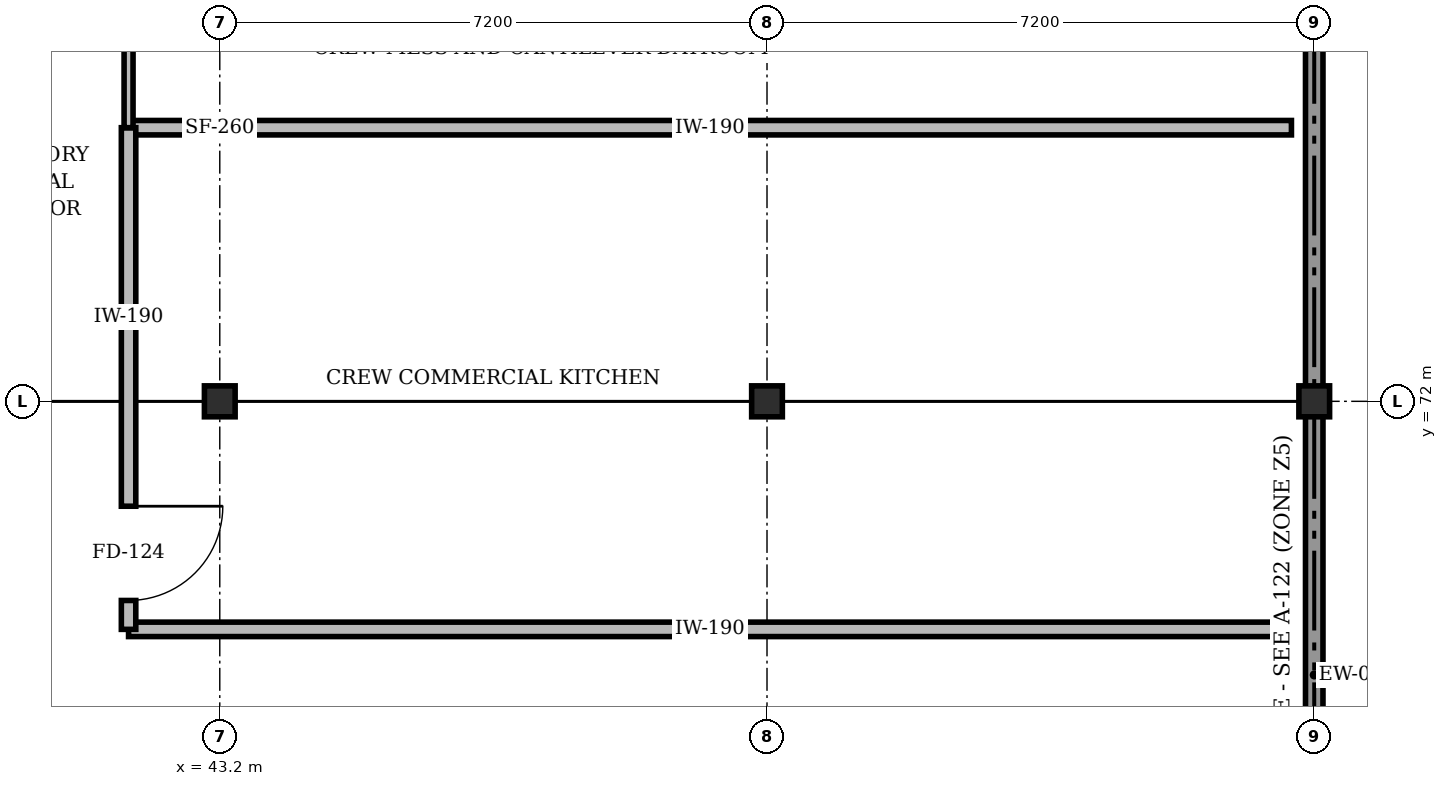
"""IFC4 building model, lengths in metres.
Left out: names, types, materials, properties, quantities, classifications, styles, units other than length and angle.
Written with IfcOpenShell. Run it as: python <this file> out.ifc"""

import sys

from ifc_helpers import new_model, si_unit, direction, frame, frame_2d, origin, origin_2d, place, context, subcontext, project, spatial, rectangle, i_section, extrude, element, fill, save


model = new_model("IFC4")
c1 = context("Model", 3, precision=1e-05, world=origin(), true_north=direction((0.0, 1.0)))
c2 = subcontext(c1, "Body", "Model", "MODEL_VIEW")
j1 = project(units=[si_unit("LENGTHUNIT", "METRE"), si_unit("PLANEANGLEUNIT", "RADIAN")], contexts=[c1])
p1 = place(None, origin())
s1 = spatial("IfcSite", under=j1, at=p1, CompositionType="ELEMENT")
p2 = place(p1, origin())
s2 = spatial("IfcBuilding", under=s1, at=p2, CompositionType="ELEMENT")
p3 = place(p2, frame((0.0, 0.0, 10.2)))
s3 = spatial("IfcBuildingStorey", under=s2, at=p3, CompositionType="ELEMENT", Elevation=10.2)
for number, where, z_axis, x_axis in (
    (1, (43.2, 72.0, 0.0), (0.0, 0.0, 1.0), (1.0, 0.0, 0.0)),
    (2, (50.4, 72.0, 0.0), (0.0, 0.0, 1.0), (1.0, 0.0, 0.0)),
    (3, (57.6, 72.0, 0.0), (0.0, 0.0, 1.0), (1.0, 0.0, 0.0)),
):
    element("IfcColumn", number, at=place(p3, frame(where, z_axis=z_axis, x_axis=x_axis)), inside=s3, PredefinedType="COLUMN", context=c2, shape_type="SweptSolid", body=[
        extrude(i_section(OverallWidth=0.404, OverallDepth=0.407, WebThickness=0.027, FlangeThickness=0.044, at=origin_2d()), origin(), (0.0, 0.0, 1.0), 4.2),
    ])
p4 = place(p3, frame((57.6, 57.6, 0.0), z_axis=(0.0, 0.0, 1.0), x_axis=(0.0, 1.0, 0.0)))
e4 = element("IfcWall", 4, at=p4, inside=s3, PredefinedType="STANDARD", context=c2, shape_type="SweptSolid", body=[
    extrude(rectangle(XDim=41.4, YDim=0.23, at=frame_2d((20.7, 0.0))), origin(), (0.0, 0.0, 1.0), 3.0),
])
p5 = place(p4, frame((39.3, 0.0, 1.25)))
e5 = element("IfcOpeningElement", 5, at=p5, cuts=e4, PredefinedType="OPENING", context=c2, shape_type="SweptSolid", body=[
    extrude(rectangle(XDim=1.26, YDim=1.38, at=frame_2d((0.63, 0.69))), frame((0.0, 0.125, 0.0), z_axis=(0.0, -1.0, 0.0), x_axis=(1.0, 0.0, 0.0)), (0.0, 0.0, 1.0), 0.25),
])
for number, where, z_axis, x_axis in (
    (6, (42.0, 69.0, 0.0), (0.0, 0.0, 1.0), (1.0, 0.0, 0.0)),
    (7, (57.3, 75.6, 0.0), (0.0, 0.0, 1.0), (-1.0, 0.0, 0.0)),
):
    element("IfcWall", number, at=place(p3, frame(where, z_axis=z_axis, x_axis=x_axis)), inside=s3, PredefinedType="STANDARD", context=c2, shape_type="SweptSolid", body=[
        extrude(rectangle(XDim=15.3, YDim=0.19, at=frame_2d((7.65, 0.0))), origin(), (0.0, 0.0, 1.0), 3.038),
    ])
p6 = place(p3, frame((42.0, 75.6, 0.0), z_axis=(0.0, 0.0, 1.0), x_axis=(0.0, -1.0, 0.0)))
e8 = element("IfcWall", 8, at=p6, inside=s3, PredefinedType="STANDARD", context=c2, shape_type="SweptSolid", body=[
    extrude(rectangle(XDim=6.6, YDim=0.19, at=frame_2d((3.3, 0.0))), origin(), (0.0, 0.0, 1.0), 3.257),
])
p7 = place(p6, frame((4.98, 0.0, 0.0)))
e9 = element("IfcOpeningElement", 9, at=p7, cuts=e8, PredefinedType="OPENING", context=c2, shape_type="SweptSolid", body=[
    extrude(rectangle(XDim=1.24, YDim=2.2, at=frame_2d((0.62, 1.1))), frame((0.0, 0.105, 0.0), z_axis=(0.0, -1.0, 0.0), x_axis=(1.0, 0.0, 0.0)), (0.0, 0.0, 1.0), 0.21),
])
p8 = place(p3, frame((42.0, 98.7, 0.0), z_axis=(0.0, 0.0, 1.0), x_axis=(0.0, -1.0, 0.0)))
e10 = element("IfcWall", 10, at=p8, inside=s3, PredefinedType="STANDARD", context=c2, shape_type="SweptSolid", body=[
    extrude(rectangle(XDim=23.1, YDim=0.118, at=frame_2d((11.55, 0.0))), origin(), (0.0, 0.0, 1.0), 3.257),
])
p9 = place(p8, frame((20.54, 0.0, 0.0)))
e11 = element("IfcOpeningElement", 11, at=p9, cuts=e10, PredefinedType="OPENING", context=c2, shape_type="SweptSolid", body=[
    extrude(rectangle(XDim=1.52, YDim=2.3, at=frame_2d((0.76, 1.15))), frame((0.0, 0.069, 0.0), z_axis=(0.0, -1.0, 0.0), x_axis=(1.0, 0.0, 0.0)), (0.0, 0.0, 1.0), 0.138),
])
p10 = place(p7, origin())
e12 = element("IfcDoor", 12, at=p10, inside=s3, OperationType="SINGLE_SWING_LEFT", PredefinedType="DOOR", context=c2, shape_type="SweptSolid", body=[
    extrude(rectangle(XDim=1.24, YDim=2.2, at=frame_2d((0.62, 1.1))), frame((0.0, 0.025, 0.0), z_axis=(0.0, -1.0, 0.0), x_axis=(1.0, 0.0, 0.0)), (0.0, 0.0, 1.0), 0.05),
])
fill(e9, e12)
save(model, sys.argv[1])
